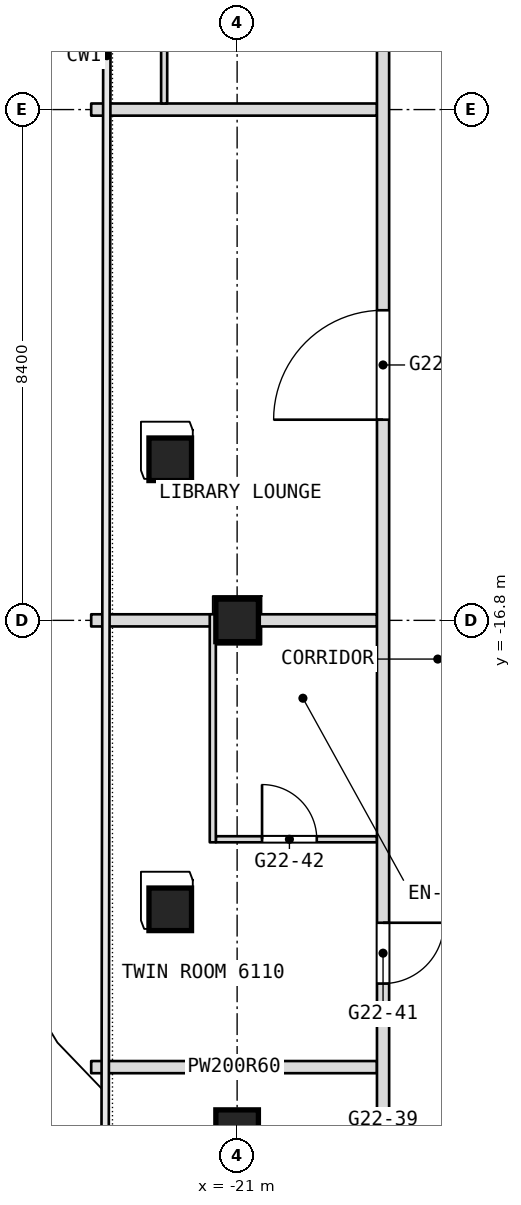
"""IFC4 building model, lengths in metres.
Left out: names, types, materials, properties, quantities, classifications, styles, units other than length and angle.
Written with IfcOpenShell. Run it as: python <this file> out.ifc"""

import sys

from ifc_helpers import new_model, si_unit, direction, frame, frame_2d, origin, origin_2d, place, context, subcontext, project, spatial, rectangle, extrude, element, fill, save


model = new_model("IFC4")
c1 = context("Model", 3, precision=1e-05, world=origin(), true_north=direction((0.0, 1.0)))
c2 = subcontext(c1, "Body", "Model", "MODEL_VIEW")
j1 = project(units=[si_unit("LENGTHUNIT", "METRE"), si_unit("PLANEANGLEUNIT", "RADIAN")], contexts=[c1])
p1 = place(None, origin())
s1 = spatial("IfcSite", under=j1, at=p1, CompositionType="ELEMENT")
p2 = place(p1, origin())
s2 = spatial("IfcBuilding", under=s1, at=p2, CompositionType="ELEMENT")
p3 = place(p2, frame((0.0, 0.0, 266.9)))
s3 = spatial("IfcBuildingStorey", under=s2, at=p3, CompositionType="ELEMENT", Elevation=266.9)
p4 = place(p3, frame((-21.0, -25.2, -0.26), z_axis=(0.0, 0.0, 1.0), x_axis=(1.0, 0.0, 0.0)))
e1 = element("IfcColumn", 1, at=p4, inside=s3, PredefinedType="COLUMN", context=c2, shape_type="SweptSolid", body=[
    extrude(rectangle(XDim=0.7, YDim=0.7, at=origin_2d()), origin(), (0.0, 0.0, 1.0), 3.86),
])
for number, where, z_axis, x_axis in (
    (2, (-21.0, -16.8, 0.0), (0.0, 0.0, 1.0), (1.0, 0.0, 0.0)),
    (3, (-22.1, -21.552, 0.0), (0.0, 0.0, 1.0), (1.0, 0.0, 0.0)),
    (4, (-22.1, -14.151, 0.0), (0.0, 0.0, 1.0), (1.0, 0.0, 0.0)),
):
    element("IfcColumn", number, at=place(p3, frame(where, z_axis=z_axis, x_axis=x_axis)), inside=s3, PredefinedType="COLUMN", context=c2, shape_type="SweptSolid", body=[
        extrude(rectangle(XDim=0.7, YDim=0.7, at=origin_2d()), origin(), (0.0, 0.0, 1.0), 3.6),
    ])
p5 = place(p3, frame((-23.4, -24.147, 0.0), z_axis=(0.0, 0.0, 1.0), x_axis=(1.0, 0.0, 0.0)))
e5 = element("IfcWall", 5, at=p5, inside=s3, PredefinedType="PARTITIONING", context=c2, shape_type="SweptSolid", body=[
    extrude(rectangle(XDim=4.7, YDim=0.2, at=frame_2d((2.35, 0.0))), origin(), (0.0, 0.0, 1.0), 3.34),
])
p6 = place(p3, frame((-21.35, -20.4, 0.0), z_axis=(0.0, 0.0, 1.0), x_axis=(1.0, 0.0, 0.0)))
e6 = element("IfcWall", 6, at=p6, inside=s3, PredefinedType="PARTITIONING", context=c2, shape_type="SweptSolid", body=[
    extrude(rectangle(XDim=2.65, YDim=0.1, at=frame_2d((1.325, 0.0))), origin(), (0.0, 0.0, 1.0), 3.34),
])
p7 = place(p6, frame((0.76, 0.0, 0.0)))
e7 = element("IfcOpeningElement", 7, at=p7, cuts=e6, PredefinedType="OPENING", context=c2, shape_type="SweptSolid", body=[
    extrude(rectangle(XDim=0.9, YDim=2.1, at=frame_2d((0.45, 1.05))), frame((0.0, 0.05, 0.0), z_axis=(0.0, -1.0, 0.0), x_axis=(1.0, 0.0, 0.0)), (0.0, 0.0, 1.0), 0.1),
])
for number, where, z_axis, x_axis in (
    (8, (-23.4, -16.8, 0.0), (0.0, 0.0, 1.0), (1.0, 0.0, 0.0)),
    (9, (-23.4, -8.4, 0.0), (0.0, 0.0, 1.0), (1.0, 0.0, 0.0)),
):
    element("IfcWall", number, at=place(p3, frame(where, z_axis=z_axis, x_axis=x_axis)), inside=s3, PredefinedType="PARTITIONING", context=c2, shape_type="SweptSolid", body=[
        extrude(rectangle(XDim=4.7, YDim=0.2, at=frame_2d((2.35, 0.0))), origin(), (0.0, 0.0, 1.0), 3.0),
    ])
p8 = place(p3, frame((-18.6, -31.794, 0.0), z_axis=(0.0, 0.0, 1.0), x_axis=(0.0, 1.0, 0.0)))
e10 = element("IfcWall", 10, at=p8, inside=s3, PredefinedType="PARTITIONING", context=c2, shape_type="SweptSolid", body=[
    extrude(rectangle(XDim=48.697, YDim=0.2, at=frame_2d((24.349, 0.0))), origin(), (0.0, 0.0, 1.0), 3.34),
])
p9 = place(p8, frame((5.274, 0.0, 0.0)))
e11 = element("IfcOpeningElement", 11, at=p9, cuts=e10, PredefinedType="OPENING", context=c2, shape_type="SweptSolid", body=[
    extrude(rectangle(XDim=1.0, YDim=2.1, at=frame_2d((0.5, 1.05))), frame((0.0, 0.1, 0.0), z_axis=(0.0, -1.0, 0.0), x_axis=(1.0, 0.0, 0.0)), (0.0, 0.0, 1.0), 0.2),
])
p10 = place(p8, frame((9.021, 0.0, 0.0)))
e12 = element("IfcOpeningElement", 12, at=p10, cuts=e10, PredefinedType="OPENING", context=c2, shape_type="SweptSolid", body=[
    extrude(rectangle(XDim=1.0, YDim=2.1, at=frame_2d((0.5, 1.05))), frame((0.0, 0.1, 0.0), z_axis=(0.0, -1.0, 0.0), x_axis=(1.0, 0.0, 0.0)), (0.0, 0.0, 1.0), 0.2),
])
p11 = place(p8, frame((18.294, 0.0, 0.0)))
e13 = element("IfcOpeningElement", 13, at=p11, cuts=e10, PredefinedType="OPENING", context=c2, shape_type="SweptSolid", body=[
    extrude(rectangle(XDim=1.8, YDim=2.1, at=frame_2d((0.9, 1.05))), frame((0.0, 0.1, 0.0), z_axis=(0.0, -1.0, 0.0), x_axis=(1.0, 0.0, 0.0)), (0.0, 0.0, 1.0), 0.2),
])
p12 = place(p8, frame((27.094, 0.0, 0.0)))
e14 = element("IfcOpeningElement", 14, at=p12, cuts=e10, PredefinedType="OPENING", context=c2, shape_type="SweptSolid", body=[
    extrude(rectangle(XDim=1.1, YDim=2.1, at=frame_2d((0.55, 1.05))), frame((0.0, 0.1, 0.0), z_axis=(0.0, -1.0, 0.0), x_axis=(1.0, 0.0, 0.0)), (0.0, 0.0, 1.0), 0.2),
])
p13 = place(p8, frame((35.394, 0.0, 0.0)))
e15 = element("IfcOpeningElement", 15, at=p13, cuts=e10, PredefinedType="OPENING", context=c2, shape_type="SweptSolid", body=[
    extrude(rectangle(XDim=1.1, YDim=2.1, at=frame_2d((0.55, 1.05))), frame((0.0, 0.1, 0.0), z_axis=(0.0, -1.0, 0.0), x_axis=(1.0, 0.0, 0.0)), (0.0, 0.0, 1.0), 0.2),
])
p14 = place(p8, frame((43.894, 0.0, 0.0)))
e16 = element("IfcOpeningElement", 16, at=p14, cuts=e10, PredefinedType="OPENING", context=c2, shape_type="SweptSolid", body=[
    extrude(rectangle(XDim=1.1, YDim=2.1, at=frame_2d((0.55, 1.05))), frame((0.0, 0.1, 0.0), z_axis=(0.0, -1.0, 0.0), x_axis=(1.0, 0.0, 0.0)), (0.0, 0.0, 1.0), 0.2),
])
p15 = place(p3, frame((-21.4, -20.45, 0.0), z_axis=(0.0, 0.0, 1.0), x_axis=(0.0, 1.0, 0.0)))
e17 = element("IfcWall", 17, at=p15, inside=s3, PredefinedType="PARTITIONING", context=c2, shape_type="SweptSolid", body=[
    extrude(rectangle(XDim=3.75, YDim=0.1, at=frame_2d((1.875, 0.0))), origin(), (0.0, 0.0, 1.0), 3.34),
])
p16 = place(p3, frame((-22.2, -8.3, 0.0), z_axis=(0.0, 0.0, 1.0), x_axis=(0.0, 1.0, 0.0)))
e18 = element("IfcWall", 18, at=p16, inside=s3, PredefinedType="PARTITIONING", context=c2, shape_type="SweptSolid", body=[
    extrude(rectangle(XDim=0.95, YDim=0.1, at=frame_2d((0.475, 0.0))), origin(), (0.0, 0.0, 1.0), 3.34),
])
p17 = place(p7, origin())
e19 = element("IfcDoor", 19, at=p17, inside=s3, OperationType="SINGLE_SWING_LEFT", PredefinedType="DOOR", context=c2, shape_type="SweptSolid", body=[
    extrude(rectangle(XDim=0.9, YDim=2.1, at=frame_2d((0.45, 1.05))), frame((0.0, 0.025, 0.0), z_axis=(0.0, -1.0, 0.0), x_axis=(1.0, 0.0, 0.0)), (0.0, 0.0, 1.0), 0.05),
])
fill(e7, e19)
p18 = place(p10, origin())
e20 = element("IfcDoor", 20, at=p18, inside=s3, OperationType="SINGLE_SWING_RIGHT", PredefinedType="DOOR", context=c2, shape_type="SweptSolid", body=[
    extrude(rectangle(XDim=1.0, YDim=2.1, at=frame_2d((0.5, 1.05))), frame((0.0, 0.025, 0.0), z_axis=(0.0, -1.0, 0.0), x_axis=(1.0, 0.0, 0.0)), (0.0, 0.0, 1.0), 0.05),
])
fill(e12, e20)
p19 = place(p11, origin())
e21 = element("IfcDoor", 21, at=p19, inside=s3, OperationType="DOUBLE_DOOR_SINGLE_SWING", PredefinedType="DOOR", context=c2, shape_type="SweptSolid", body=[
    extrude(rectangle(XDim=1.8, YDim=2.1, at=frame_2d((0.9, 1.05))), frame((0.0, 0.025, 0.0), z_axis=(0.0, -1.0, 0.0), x_axis=(1.0, 0.0, 0.0)), (0.0, 0.0, 1.0), 0.05),
])
fill(e13, e21)
save(model, sys.argv[1])
